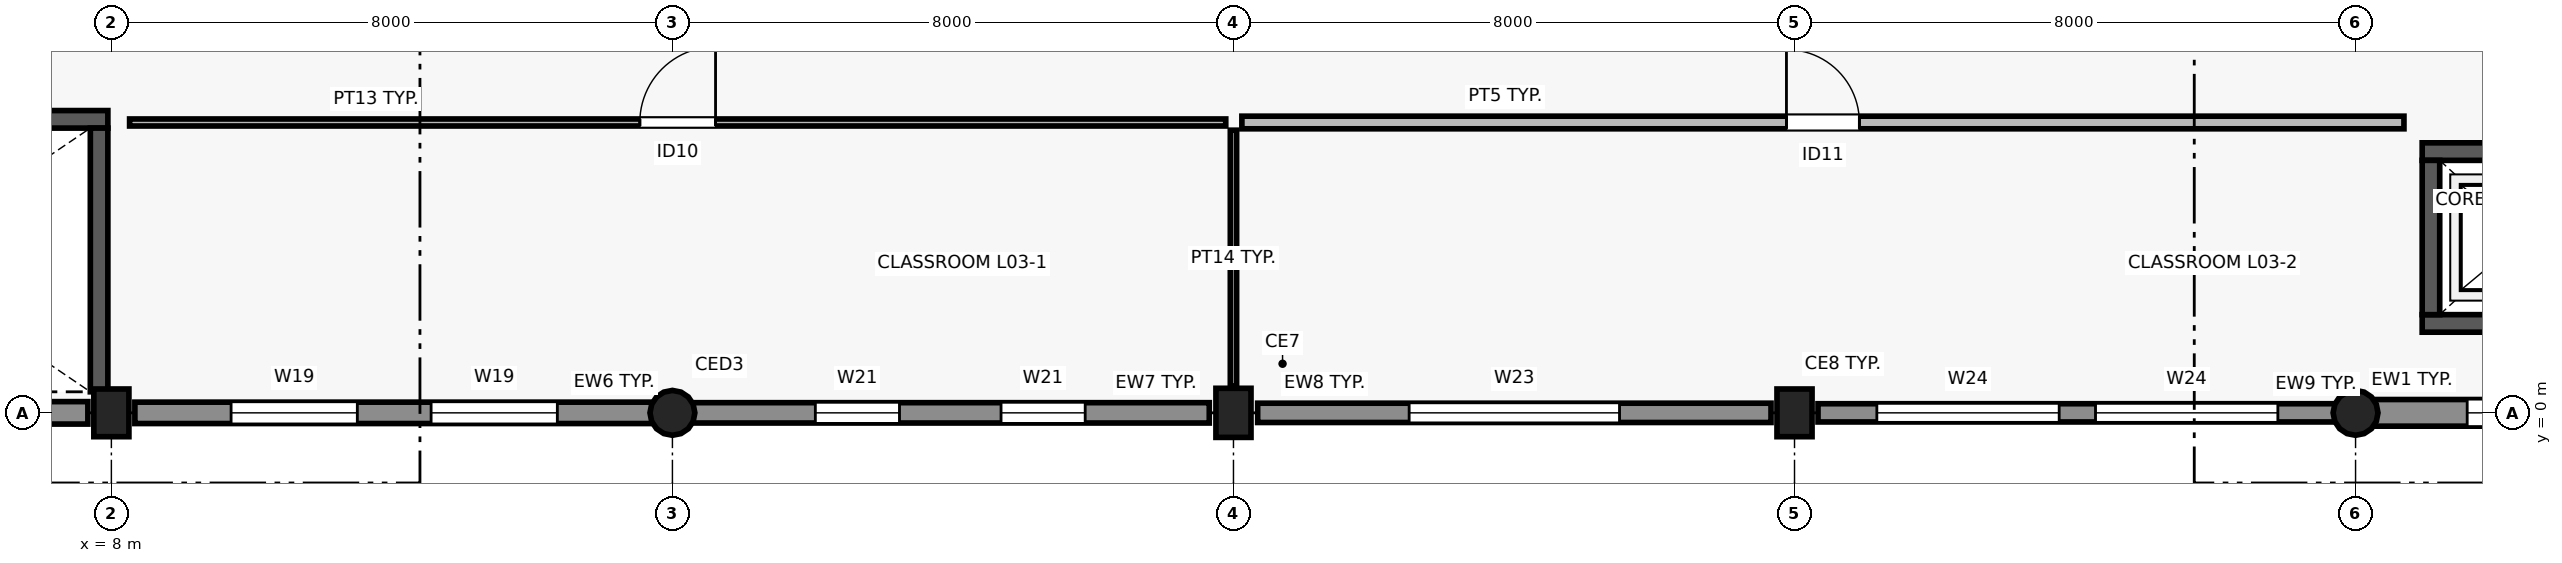
"""IFC4 building model, lengths in metres.
Left out: names, types, materials, properties, quantities, classifications, styles, units other than length and angle.
Written with IfcOpenShell. Run it as: python <this file> out.ifc"""

import sys

from ifc_helpers import new_model, si_unit, direction, frame, frame_2d, origin, origin_2d, place, context, subcontext, project, spatial, rectangle, circle, extrude, element, fill, save


model = new_model("IFC4")
c1 = context("Model", 3, precision=1e-05, world=origin(), true_north=direction((0.0, 1.0)))
c2 = subcontext(c1, "Body", "Model", "MODEL_VIEW")
j1 = project(units=[si_unit("LENGTHUNIT", "METRE"), si_unit("PLANEANGLEUNIT", "RADIAN")], contexts=[c1])
p1 = place(None, origin())
s1 = spatial("IfcSite", under=j1, at=p1, CompositionType="ELEMENT")
p2 = place(p1, origin())
s2 = spatial("IfcBuilding", under=s1, at=p2, CompositionType="ELEMENT")
p3 = place(p2, frame((0.0, 0.0, 13.2)))
s3 = spatial("IfcBuildingStorey", under=s2, at=p3, CompositionType="ELEMENT", Elevation=13.2)
p4 = place(p3, frame((8.0, 0.0, 0.0), z_axis=(0.0, 0.0, 1.0), x_axis=(1.0, 0.0, 0.0)))
e1 = element("IfcColumn", 1, at=p4, inside=s3, PredefinedType="COLUMN", context=c2, shape_type="SweptSolid", body=[
    extrude(rectangle(XDim=0.68, YDim=0.5, at=origin_2d()), origin(), (0.0, 0.0, 1.0), 4.2),
])
p5 = place(p3, frame((16.0, 0.0, 0.0), z_axis=(0.0, 0.0, 1.0), x_axis=(1.0, 0.0, 0.0)))
e2 = element("IfcColumn", 2, at=p5, inside=s3, PredefinedType="COLUMN", context=c2, shape_type="SweptSolid", body=[
    extrude(circle(Radius=0.32, at=origin_2d()), origin(), (0.0, 0.0, 1.0), 4.2),
])
p6 = place(p3, frame((24.0, 0.0, 0.0), z_axis=(0.0, 0.0, 1.0), x_axis=(1.0, 0.0, 0.0)))
e3 = element("IfcColumn", 3, at=p6, inside=s3, PredefinedType="COLUMN", context=c2, shape_type="SweptSolid", body=[
    extrude(rectangle(XDim=0.7, YDim=0.5, at=origin_2d()), origin(), (0.0, 0.0, 1.0), 4.2),
])
p7 = place(p3, frame((32.0, 0.0, 0.0), z_axis=(0.0, 0.0, 1.0), x_axis=(1.0, 0.0, 0.0)))
e4 = element("IfcColumn", 4, at=p7, inside=s3, PredefinedType="COLUMN", context=c2, shape_type="SweptSolid", body=[
    extrude(rectangle(XDim=0.68, YDim=0.5, at=origin_2d()), origin(), (0.0, 0.0, 1.0), 4.2),
])
p8 = place(p3, frame((40.0, 0.0, 0.0), z_axis=(0.0, 0.0, 1.0), x_axis=(1.0, 0.0, 0.0)))
e5 = element("IfcColumn", 5, at=p8, inside=s3, PredefinedType="COLUMN", context=c2, shape_type="SweptSolid", body=[
    extrude(circle(Radius=0.32, at=origin_2d()), origin(), (0.0, 0.0, 1.0), 4.2),
])
p9 = place(p3, frame((0.345, 0.0, 0.0), z_axis=(0.0, 0.0, 1.0), x_axis=(1.0, 0.0, 0.0)))
e6 = element("IfcWall", 6, at=p9, inside=s3, PredefinedType="SOLIDWALL", context=c2, shape_type="SweptSolid", body=[
    extrude(rectangle(XDim=7.32, YDim=0.32, at=frame_2d((3.66, 0.0))), origin(), (0.0, 0.0, 1.0), 3.92),
])
p10 = place(p3, frame((8.335, 0.0, 0.0), z_axis=(0.0, 0.0, 1.0), x_axis=(1.0, 0.0, 0.0)))
e7 = element("IfcWall", 7, at=p10, inside=s3, PredefinedType="SOLIDWALL", context=c2, shape_type="SweptSolid", body=[
    extrude(rectangle(XDim=7.396, YDim=0.305, at=frame_2d((3.698, 0.0))), origin(), (0.0, 0.0, 1.0), 3.92),
])
p11 = place(p10, frame((1.372, 0.0, 0.9)))
e8 = element("IfcOpeningElement", 8, at=p11, cuts=e7, PredefinedType="OPENING", context=c2, shape_type="SweptSolid", body=[
    extrude(rectangle(XDim=1.8, YDim=1.25, at=frame_2d((0.9, 0.625))), frame((0.0, 0.162, 0.0), z_axis=(0.0, -1.0, 0.0), x_axis=(1.0, 0.0, 0.0)), (0.0, 0.0, 1.0), 0.325),
])
p12 = place(p10, frame((4.224, 0.0, 0.9)))
e9 = element("IfcOpeningElement", 9, at=p12, cuts=e7, PredefinedType="OPENING", context=c2, shape_type="SweptSolid", body=[
    extrude(rectangle(XDim=1.8, YDim=1.25, at=frame_2d((0.9, 0.625))), frame((0.0, 0.162, 0.0), z_axis=(0.0, -1.0, 0.0), x_axis=(1.0, 0.0, 0.0)), (0.0, 0.0, 1.0), 0.325),
])
p13 = place(p3, frame((16.269, 0.0, 0.0), z_axis=(0.0, 0.0, 1.0), x_axis=(1.0, 0.0, 0.0)))
e10 = element("IfcWall", 10, at=p13, inside=s3, PredefinedType="SOLIDWALL", context=c2, shape_type="SweptSolid", body=[
    extrude(rectangle(XDim=7.386, YDim=0.29, at=frame_2d((3.693, 0.0))), origin(), (0.0, 0.0, 1.0), 3.31),
])
p14 = place(p13, frame((1.769, 0.0, 0.9)))
e11 = element("IfcOpeningElement", 11, at=p14, cuts=e10, PredefinedType="OPENING", context=c2, shape_type="SweptSolid", body=[
    extrude(rectangle(XDim=1.2, YDim=1.25, at=frame_2d((0.6, 0.625))), frame((0.0, 0.155, 0.0), z_axis=(0.0, -1.0, 0.0), x_axis=(1.0, 0.0, 0.0)), (0.0, 0.0, 1.0), 0.31),
])
p15 = place(p13, frame((4.417, 0.0, 0.9)))
e12 = element("IfcOpeningElement", 12, at=p15, cuts=e10, PredefinedType="OPENING", context=c2, shape_type="SweptSolid", body=[
    extrude(rectangle(XDim=1.2, YDim=1.25, at=frame_2d((0.6, 0.625))), frame((0.0, 0.155, 0.0), z_axis=(0.0, -1.0, 0.0), x_axis=(1.0, 0.0, 0.0)), (0.0, 0.0, 1.0), 0.31),
])
p16 = place(p3, frame((24.345, 0.0, 0.0), z_axis=(0.0, 0.0, 1.0), x_axis=(1.0, 0.0, 0.0)))
e13 = element("IfcWall", 13, at=p16, inside=s3, PredefinedType="SOLIDWALL", context=c2, shape_type="SweptSolid", body=[
    extrude(rectangle(XDim=7.32, YDim=0.275, at=frame_2d((3.66, 0.0))), origin(), (0.0, 0.0, 1.0), 3.36),
])
p17 = place(p16, frame((2.16, 0.0, 0.9)))
e14 = element("IfcOpeningElement", 14, at=p17, cuts=e13, PredefinedType="OPENING", context=c2, shape_type="SweptSolid", body=[
    extrude(rectangle(XDim=3.0, YDim=1.65, at=frame_2d((1.5, 0.825))), frame((0.0, 0.147, 0.0), z_axis=(0.0, -1.0, 0.0), x_axis=(1.0, 0.0, 0.0)), (0.0, 0.0, 1.0), 0.295),
])
p18 = place(p3, frame((32.335, 0.0, 0.0), z_axis=(0.0, 0.0, 1.0), x_axis=(1.0, 0.0, 0.0)))
e15 = element("IfcWall", 15, at=p18, inside=s3, PredefinedType="SOLIDWALL", context=c2, shape_type="SweptSolid", body=[
    extrude(rectangle(XDim=7.396, YDim=0.26, at=frame_2d((3.698, 0.0))), origin(), (0.0, 0.0, 1.0), 3.41),
])
p19 = place(p18, frame((0.839, 0.0, 0.9)))
e16 = element("IfcOpeningElement", 16, at=p19, cuts=e15, PredefinedType="OPENING", context=c2, shape_type="SweptSolid", body=[
    extrude(rectangle(XDim=2.6, YDim=1.65, at=frame_2d((1.3, 0.825))), frame((0.0, 0.14, 0.0), z_axis=(0.0, -1.0, 0.0), x_axis=(1.0, 0.0, 0.0)), (0.0, 0.0, 1.0), 0.28),
])
p20 = place(p18, frame((3.957, 0.0, 0.9)))
e17 = element("IfcOpeningElement", 17, at=p20, cuts=e15, PredefinedType="OPENING", context=c2, shape_type="SweptSolid", body=[
    extrude(rectangle(XDim=2.6, YDim=1.65, at=frame_2d((1.3, 0.825))), frame((0.0, 0.14, 0.0), z_axis=(0.0, -1.0, 0.0), x_axis=(1.0, 0.0, 0.0)), (0.0, 0.0, 1.0), 0.28),
])
p21 = place(p3, frame((40.269, 0.0, 0.0), z_axis=(0.0, 0.0, 1.0), x_axis=(1.0, 0.0, 0.0)))
e18 = element("IfcWall", 18, at=p21, inside=s3, PredefinedType="SOLIDWALL", context=c2, shape_type="SweptSolid", body=[
    extrude(rectangle(XDim=7.386, YDim=0.38, at=frame_2d((3.693, 0.0))), origin(), (0.0, 0.0, 1.0), 3.36),
])
p22 = place(p21, frame((1.323, 0.0, 0.9)))
e19 = element("IfcOpeningElement", 19, at=p22, cuts=e18, PredefinedType="OPENING", context=c2, shape_type="SweptSolid", body=[
    extrude(rectangle(XDim=2.4, YDim=1.8, at=frame_2d((1.2, 0.9))), frame((0.0, 0.2, 0.0), z_axis=(0.0, -1.0, 0.0), x_axis=(1.0, 0.0, 0.0)), (0.0, 0.0, 1.0), 0.4),
])
p23 = place(p21, frame((4.194, 0.0, 0.9)))
e20 = element("IfcOpeningElement", 20, at=p23, cuts=e18, PredefinedType="OPENING", context=c2, shape_type="SweptSolid", body=[
    extrude(rectangle(XDim=2.4, YDim=1.8, at=frame_2d((1.2, 0.9))), frame((0.0, 0.2, 0.0), z_axis=(0.0, -1.0, 0.0), x_axis=(1.0, 0.0, 0.0)), (0.0, 0.0, 1.0), 0.4),
])
p24 = place(p3, frame((40.95, 1.275, 0.0), z_axis=(0.0, 0.0, 1.0), x_axis=(1.0, 0.0, 0.0)))
e21 = element("IfcWall", 21, at=p24, inside=s3, PredefinedType="SHEAR", context=c2, shape_type="SweptSolid", body=[
    extrude(rectangle(XDim=2.9, YDim=0.25, at=frame_2d((1.45, 0.0))), origin(), (0.0, 0.0, 1.0), 3.92),
])
p25 = place(p3, frame((40.95, 3.725, 0.0), z_axis=(0.0, 0.0, 1.0), x_axis=(1.0, 0.0, 0.0)))
e22 = element("IfcWall", 22, at=p25, inside=s3, PredefinedType="SHEAR", context=c2, shape_type="SweptSolid", body=[
    extrude(rectangle(XDim=2.9, YDim=0.25, at=frame_2d((1.45, 0.0))), origin(), (0.0, 0.0, 1.0), 3.92),
])
p26 = place(p25, frame((0.95, 0.0, 0.0)))
e23 = element("IfcOpeningElement", 23, at=p26, cuts=e22, PredefinedType="OPENING", context=c2, shape_type="SweptSolid", body=[
    extrude(rectangle(XDim=1.0, YDim=2.15, at=frame_2d((0.5, 1.075))), frame((0.0, 0.135, 0.0), z_axis=(0.0, -1.0, 0.0), x_axis=(1.0, 0.0, 0.0)), (0.0, 0.0, 1.0), 0.27),
])
p27 = place(p3, frame((41.075, 1.4, 0.0), z_axis=(0.0, 0.0, 1.0), x_axis=(0.0, 1.0, 0.0)))
e24 = element("IfcWall", 24, at=p27, inside=s3, PredefinedType="SHEAR", context=c2, shape_type="SweptSolid", body=[
    extrude(rectangle(XDim=2.2, YDim=0.25, at=frame_2d((1.1, 0.0))), origin(), (0.0, 0.0, 1.0), 3.92),
])
p28 = place(p3, frame((0.05, 4.185, 0.0), z_axis=(0.0, 0.0, 1.0), x_axis=(1.0, 0.0, 0.0)))
e25 = element("IfcWall", 25, at=p28, inside=s3, PredefinedType="SHEAR", context=c2, shape_type="SweptSolid", body=[
    extrude(rectangle(XDim=7.9, YDim=0.25, at=frame_2d((3.95, 0.0))), origin(), (0.0, 0.0, 1.0), 3.92),
])
p29 = place(p28, frame((0.5, 0.0, 0.0)))
e26 = element("IfcOpeningElement", 26, at=p29, cuts=e25, PredefinedType="OPENING", context=c2, shape_type="SweptSolid", body=[
    extrude(rectangle(XDim=1.25, YDim=2.2, at=frame_2d((0.625, 1.1))), frame((0.0, 0.135, 0.0), z_axis=(0.0, -1.0, 0.0), x_axis=(1.0, 0.0, 0.0)), (0.0, 0.0, 1.0), 0.27),
])
p30 = place(p3, frame((7.825, 0.3, 0.0), z_axis=(0.0, 0.0, 1.0), x_axis=(0.0, 1.0, 0.0)))
e27 = element("IfcWall", 27, at=p30, inside=s3, PredefinedType="SHEAR", context=c2, shape_type="SweptSolid", body=[
    extrude(rectangle(XDim=3.76, YDim=0.25, at=frame_2d((1.88, 0.0))), origin(), (0.0, 0.0, 1.0), 3.92),
])
p31 = place(p3, frame((8.26, 4.14, 0.0), z_axis=(0.0, 0.0, 1.0), x_axis=(1.0, 0.0, 0.0)))
e28 = element("IfcWall", 28, at=p31, inside=s3, PredefinedType="PARTITIONING", context=c2, shape_type="SweptSolid", body=[
    extrude(rectangle(XDim=15.63, YDim=0.1, at=frame_2d((7.815, 0.0))), origin(), (0.0, 0.0, 1.0), 3.9),
])
p32 = place(p31, frame((7.275, 0.0, 0.0)))
e29 = element("IfcOpeningElement", 29, at=p32, cuts=e28, PredefinedType="OPENING", context=c2, shape_type="SweptSolid", body=[
    extrude(rectangle(XDim=1.08, YDim=2.15, at=frame_2d((0.54, 1.075))), frame((0.0, 0.06, 0.0), z_axis=(0.0, -1.0, 0.0), x_axis=(1.0, 0.0, 0.0)), (0.0, 0.0, 1.0), 0.12),
])
p33 = place(p3, frame((24.0, 0.38, 0.0), z_axis=(0.0, 0.0, 1.0), x_axis=(0.0, 1.0, 0.0)))
e30 = element("IfcWall", 30, at=p33, inside=s3, PredefinedType="PARTITIONING", context=c2, shape_type="SweptSolid", body=[
    extrude(rectangle(XDim=3.65, YDim=0.09, at=frame_2d((1.825, 0.0))), origin(), (0.0, 0.0, 1.0), 3.34),
])
p34 = place(p3, frame((24.12, 4.14, 0.0), z_axis=(0.0, 0.0, 1.0), x_axis=(1.0, 0.0, 0.0)))
e31 = element("IfcWall", 31, at=p34, inside=s3, PredefinedType="PARTITIONING", context=c2, shape_type="SweptSolid", body=[
    extrude(rectangle(XDim=16.57, YDim=0.18, at=frame_2d((8.285, 0.0))), origin(), (0.0, 0.0, 1.0), 3.9),
])
p35 = place(p34, frame((7.765, 0.0, 0.0)))
e32 = element("IfcOpeningElement", 32, at=p35, cuts=e31, PredefinedType="OPENING", context=c2, shape_type="SweptSolid", body=[
    extrude(rectangle(XDim=1.04, YDim=2.15, at=frame_2d((0.52, 1.075))), frame((0.0, 0.1, 0.0), z_axis=(0.0, -1.0, 0.0), x_axis=(1.0, 0.0, 0.0)), (0.0, 0.0, 1.0), 0.2),
])
p36 = place(p11, origin())
e33 = element("IfcWindow", 33, at=p36, inside=s3, PartitioningType="SINGLE_PANEL", PredefinedType="WINDOW", context=c2, shape_type="SweptSolid", body=[
    extrude(rectangle(XDim=1.8, YDim=1.25, at=frame_2d((0.9, 0.625))), frame((0.0, 0.03, 0.0), z_axis=(0.0, -1.0, 0.0), x_axis=(1.0, 0.0, 0.0)), (0.0, 0.0, 1.0), 0.06),
])
fill(e8, e33)
p37 = place(p12, origin())
e34 = element("IfcWindow", 34, at=p37, inside=s3, PartitioningType="SINGLE_PANEL", PredefinedType="WINDOW", context=c2, shape_type="SweptSolid", body=[
    extrude(rectangle(XDim=1.8, YDim=1.25, at=frame_2d((0.9, 0.625))), frame((0.0, 0.03, 0.0), z_axis=(0.0, -1.0, 0.0), x_axis=(1.0, 0.0, 0.0)), (0.0, 0.0, 1.0), 0.06),
])
fill(e9, e34)
p38 = place(p14, origin())
e35 = element("IfcWindow", 35, at=p38, inside=s3, PartitioningType="SINGLE_PANEL", PredefinedType="WINDOW", context=c2, shape_type="SweptSolid", body=[
    extrude(rectangle(XDim=1.2, YDim=1.25, at=frame_2d((0.6, 0.625))), frame((0.0, 0.03, 0.0), z_axis=(0.0, -1.0, 0.0), x_axis=(1.0, 0.0, 0.0)), (0.0, 0.0, 1.0), 0.06),
])
fill(e11, e35)
p39 = place(p15, origin())
e36 = element("IfcWindow", 36, at=p39, inside=s3, PartitioningType="SINGLE_PANEL", PredefinedType="WINDOW", context=c2, shape_type="SweptSolid", body=[
    extrude(rectangle(XDim=1.2, YDim=1.25, at=frame_2d((0.6, 0.625))), frame((0.0, 0.03, 0.0), z_axis=(0.0, -1.0, 0.0), x_axis=(1.0, 0.0, 0.0)), (0.0, 0.0, 1.0), 0.06),
])
fill(e12, e36)
p40 = place(p17, origin())
e37 = element("IfcWindow", 37, at=p40, inside=s3, PartitioningType="SINGLE_PANEL", PredefinedType="WINDOW", context=c2, shape_type="SweptSolid", body=[
    extrude(rectangle(XDim=3.0, YDim=1.65, at=frame_2d((1.5, 0.825))), frame((0.0, 0.03, 0.0), z_axis=(0.0, -1.0, 0.0), x_axis=(1.0, 0.0, 0.0)), (0.0, 0.0, 1.0), 0.06),
])
fill(e14, e37)
p41 = place(p19, origin())
e38 = element("IfcWindow", 38, at=p41, inside=s3, PartitioningType="SINGLE_PANEL", PredefinedType="WINDOW", context=c2, shape_type="SweptSolid", body=[
    extrude(rectangle(XDim=2.6, YDim=1.65, at=frame_2d((1.3, 0.825))), frame((0.0, 0.03, 0.0), z_axis=(0.0, -1.0, 0.0), x_axis=(1.0, 0.0, 0.0)), (0.0, 0.0, 1.0), 0.06),
])
fill(e16, e38)
p42 = place(p20, origin())
e39 = element("IfcWindow", 39, at=p42, inside=s3, PartitioningType="SINGLE_PANEL", PredefinedType="WINDOW", context=c2, shape_type="SweptSolid", body=[
    extrude(rectangle(XDim=2.6, YDim=1.65, at=frame_2d((1.3, 0.825))), frame((0.0, 0.03, 0.0), z_axis=(0.0, -1.0, 0.0), x_axis=(1.0, 0.0, 0.0)), (0.0, 0.0, 1.0), 0.06),
])
fill(e17, e39)
p43 = place(p22, origin())
e40 = element("IfcWindow", 40, at=p43, inside=s3, PartitioningType="SINGLE_PANEL", PredefinedType="WINDOW", context=c2, shape_type="SweptSolid", body=[
    extrude(rectangle(XDim=2.4, YDim=1.8, at=frame_2d((1.2, 0.9))), frame((0.0, 0.03, 0.0), z_axis=(0.0, -1.0, 0.0), x_axis=(1.0, 0.0, 0.0)), (0.0, 0.0, 1.0), 0.06),
])
fill(e19, e40)
p44 = place(p32, origin())
e41 = element("IfcDoor", 41, at=p44, inside=s3, OperationType="SINGLE_SWING_RIGHT", PredefinedType="DOOR", context=c2, shape_type="SweptSolid", body=[
    extrude(rectangle(XDim=1.08, YDim=2.15, at=frame_2d((0.54, 1.075))), frame((0.0, 0.025, 0.0), z_axis=(0.0, -1.0, 0.0), x_axis=(1.0, 0.0, 0.0)), (0.0, 0.0, 1.0), 0.05),
])
fill(e29, e41)
p45 = place(p35, origin())
e42 = element("IfcDoor", 42, at=p45, inside=s3, OperationType="SINGLE_SWING_LEFT", PredefinedType="DOOR", context=c2, shape_type="SweptSolid", body=[
    extrude(rectangle(XDim=1.04, YDim=2.15, at=frame_2d((0.52, 1.075))), frame((0.0, 0.025, 0.0), z_axis=(0.0, -1.0, 0.0), x_axis=(1.0, 0.0, 0.0)), (0.0, 0.0, 1.0), 0.05),
])
fill(e32, e42)
save(model, sys.argv[1])
